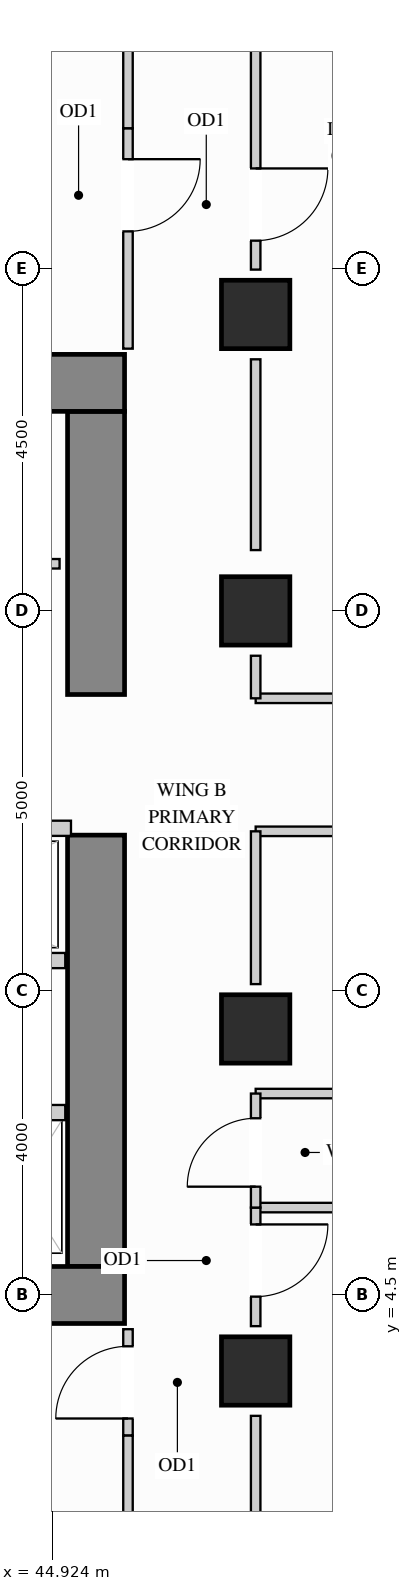
"""IFC4 building model, lengths in metres.
Left out: names, types, materials, properties, quantities, classifications, styles, units other than length and angle.
Written with IfcOpenShell. Run it as: python <this file> out.ifc"""

import sys

from ifc_helpers import new_model, si_unit, direction, frame, frame_2d, origin, origin_2d, place, context, subcontext, project, spatial, rectangle, extrude, source, transform, mapped, element, fill, save


model = new_model("IFC4")
c1 = context("Model", 3, precision=1e-05, world=origin(), true_north=direction((0.0, 1.0)))
c2 = subcontext(c1, "Body", "Model", "MODEL_VIEW")
j1 = project(units=[si_unit("LENGTHUNIT", "METRE"), si_unit("PLANEANGLEUNIT", "RADIAN")], contexts=[c1])
p1 = place(None, origin())
s1 = spatial("IfcSite", under=j1, at=p1, CompositionType="ELEMENT")
p2 = place(p1, origin())
s2 = spatial("IfcBuilding", under=s1, at=p2, CompositionType="ELEMENT")
p3 = place(p2, frame((0.0, 0.0, 120.6)))
s3 = spatial("IfcBuildingStorey", under=s2, at=p3, CompositionType="ELEMENT", Elevation=120.6)
m1 = source(origin(), c2, "Body", "SweptSolid", [
    extrude(rectangle(XDim=0.9, YDim=0.9, at=origin_2d()), origin(), (0.0, 0.0, 1.0), 3.38),
])
for number, where, z_axis, x_axis in (
    (1, (47.6, 13.5, 0.0), (0.0, 0.0, 1.0), (1.0, 0.0, 0.0)),
    (2, (47.6, 3.5, 0.0), (0.0, 0.0, 1.0), (1.0, 0.0, 0.0)),
    (3, (47.6, 8.0, 0.0), (0.0, 0.0, 1.0), (1.0, 0.0, 0.0)),
    (4, (47.6, 17.4, 0.0), (0.0, 0.0, 1.0), (1.0, 0.0, 0.0)),
):
    element("IfcColumn", number, at=place(p3, frame(where, z_axis=z_axis, x_axis=x_axis)), inside=s3, PredefinedType="COLUMN", context=c2, shape_type="MappedRepresentation", body=[
        mapped(m1, transform((0.0, 0.0, 0.0), x_axis=(1.0, 0.0, 0.0), y_axis=(0.0, 1.0, 0.0), z_axis=(0.0, 0.0, 1.0))),
    ])
m2 = source(origin(), c2, "Body", "SweptSolid", [
    extrude(rectangle(XDim=5.675, YDim=0.75, at=frame_2d((2.837, 0.0))), origin(), (0.0, 0.0, 1.0), 3.38),
])
p4 = place(p3, frame((45.5, 4.875, 0.0), z_axis=(0.0, 0.0, 1.0), x_axis=(0.0, 1.0, 0.0)))
e5 = element("IfcWall", 5, at=p4, inside=s3, PredefinedType="SHEAR", context=c2, shape_type="MappedRepresentation", body=[
    mapped(m2, transform((0.0, 0.0, 0.0), x_axis=(1.0, 0.0, 0.0), y_axis=(0.0, 1.0, 0.0), z_axis=(0.0, 0.0, 1.0))),
])
m3 = source(origin(), c2, "Body", "SweptSolid", [
    extrude(rectangle(XDim=3.725, YDim=0.75, at=frame_2d((1.863, 0.0))), origin(), (0.0, 0.0, 1.0), 3.38),
])
p5 = place(p3, frame((45.5, 12.4, 0.0), z_axis=(0.0, 0.0, 1.0), x_axis=(0.0, 1.0, 0.0)))
e6 = element("IfcWall", 6, at=p5, inside=s3, PredefinedType="SHEAR", context=c2, shape_type="MappedRepresentation", body=[
    mapped(m3, transform((0.0, 0.0, 0.0), x_axis=(1.0, 0.0, 0.0), y_axis=(0.0, 1.0, 0.0), z_axis=(0.0, 0.0, 1.0))),
])
m4 = source(origin(), c2, "Body", "SweptSolid", [
    extrude(rectangle(XDim=10.25, YDim=0.75, at=frame_2d((5.125, 0.0))), origin(), (0.0, 0.0, 1.0), 3.38),
])
for number, where, z_axis, x_axis in (
    (7, (35.625, 16.5, 0.0), (0.0, 0.0, 1.0), (1.0, 0.0, 0.0)),
    (8, (35.625, 4.5, 0.0), (0.0, 0.0, 1.0), (1.0, 0.0, 0.0)),
):
    element("IfcWall", number, at=place(p3, frame(where, z_axis=z_axis, x_axis=x_axis)), inside=s3, PredefinedType="SHEAR", context=c2, shape_type="MappedRepresentation", body=[
        mapped(m4, transform((0.0, 0.0, 0.0), x_axis=(1.0, 0.0, 0.0), y_axis=(0.0, 1.0, 0.0), z_axis=(0.0, 0.0, 1.0))),
    ])
p6 = place(p3, frame((41.8, 14.12, 0.0), z_axis=(0.0, 0.0, 1.0), x_axis=(1.0, 0.0, 0.0)))
e9 = element("IfcWall", 9, at=p6, inside=s3, PredefinedType="PARTITIONING", context=c2, shape_type="SweptSolid", body=[
    extrude(rectangle(XDim=3.22, YDim=0.125, at=frame_2d((1.61, 0.0))), origin(), (0.0, 0.0, 1.0), 3.365),
])
p7 = place(p6, frame((1.135, 0.0, 0.0)))
e10 = element("IfcOpeningElement", 10, at=p7, cuts=e9, PredefinedType="OPENING", context=c2, shape_type="SweptSolid", body=[
    extrude(rectangle(XDim=0.85, YDim=2.1, at=frame_2d((0.425, 1.05))), frame((0.0, 0.073, 0.0), z_axis=(0.0, -1.0, 0.0), x_axis=(1.0, 0.0, 0.0)), (0.0, 0.0, 1.0), 0.145),
])
m5 = source(origin(), c2, "Body", "SweptSolid", [
    extrude(rectangle(XDim=8.048, YDim=0.125, at=frame_2d((4.024, 0.0))), origin(), (0.0, 0.0, 1.0), 3.365),
])
for number, where, z_axis, x_axis in (
    (11, (47.6, 5.65, 0.0), (0.0, 0.0, 1.0), (1.0, 0.0, 0.0)),
    (12, (47.6, 7.15, 0.0), (0.0, 0.0, 1.0), (1.0, 0.0, 0.0)),
):
    element("IfcWall", number, at=place(p3, frame(where, z_axis=z_axis, x_axis=x_axis)), inside=s3, PredefinedType="PARTITIONING", context=c2, shape_type="MappedRepresentation", body=[
        mapped(m5, transform((0.0, 0.0, 0.0), x_axis=(1.0, 0.0, 0.0), y_axis=(0.0, 1.0, 0.0), z_axis=(0.0, 0.0, 1.0))),
    ])
m6 = source(origin(), c2, "Body", "SweptSolid", [
    extrude(rectangle(XDim=3.8, YDim=0.125, at=frame_2d((1.9, 0.0))), origin(), (0.0, 0.0, 1.0), 3.365),
])
p8 = place(p3, frame((47.6, 12.35, 0.0), z_axis=(0.0, 0.0, 1.0), x_axis=(1.0, 0.0, 0.0)))
e13 = element("IfcWall", 13, at=p8, inside=s3, PredefinedType="PARTITIONING", context=c2, shape_type="MappedRepresentation", body=[
    mapped(m6, transform((0.0, 0.0, 0.0), x_axis=(1.0, 0.0, 0.0), y_axis=(0.0, 1.0, 0.0), z_axis=(0.0, 0.0, 1.0))),
])
p9 = place(p3, frame((47.6, 10.6, 0.0), z_axis=(0.0, 0.0, 1.0), x_axis=(1.0, 0.0, 0.0)))
e14 = element("IfcWall", 14, at=p9, inside=s3, PredefinedType="PARTITIONING", context=c2, shape_type="SweptSolid", body=[
    extrude(rectangle(XDim=3.8, YDim=0.125, at=frame_2d((1.9, 0.0))), origin(), (0.0, 0.0, 1.0), 2.677),
])
p10 = place(p9, frame((1.425, 0.0, 0.0)))
e15 = element("IfcOpeningElement", 15, at=p10, cuts=e14, PredefinedType="OPENING", context=c2, shape_type="SweptSolid", body=[
    extrude(rectangle(XDim=0.95, YDim=2.15, at=frame_2d((0.475, 1.075))), frame((0.0, 0.073, 0.0), z_axis=(0.0, -1.0, 0.0), x_axis=(1.0, 0.0, 0.0)), (0.0, 0.0, 1.0), 0.145),
])
p11 = place(p3, frame((47.6, 4.09, 0.0), z_axis=(0.0, 0.0, 1.0), x_axis=(0.0, 1.0, 0.0)))
e16 = element("IfcWall", 16, at=p11, inside=s3, PredefinedType="PARTITIONING", context=c2, shape_type="SweptSolid", body=[
    extrude(rectangle(XDim=1.56, YDim=0.125, at=frame_2d((0.78, 0.0))), origin(), (0.0, 0.0, 1.0), 2.677),
])
p12 = place(p11, frame((0.388, 0.0, 0.0)))
e17 = element("IfcOpeningElement", 17, at=p12, cuts=e16, PredefinedType="OPENING", context=c2, shape_type="SweptSolid", body=[
    extrude(rectangle(XDim=0.95, YDim=2.15, at=frame_2d((0.475, 1.075))), frame((0.0, 0.073, 0.0), z_axis=(0.0, -1.0, 0.0), x_axis=(1.0, 0.0, 0.0)), (0.0, 0.0, 1.0), 0.145),
])
m7 = source(origin(), c2, "Body", "SweptSolid", [
    extrude(rectangle(XDim=1.72, YDim=0.125, at=frame_2d((0.86, 0.0))), origin(), (0.0, 0.0, 1.0), 2.677),
])
p13 = place(p3, frame((47.6, 1.19, 0.0), z_axis=(0.0, 0.0, 1.0), x_axis=(0.0, 1.0, 0.0)))
e18 = element("IfcWall", 18, at=p13, inside=s3, PredefinedType="PARTITIONING", context=c2, shape_type="MappedRepresentation", body=[
    mapped(m7, transform((0.0, 0.0, 0.0), x_axis=(1.0, 0.0, 0.0), y_axis=(0.0, 1.0, 0.0), z_axis=(0.0, 0.0, 1.0))),
])
m8 = source(origin(), c2, "Body", "SweptSolid", [
    extrude(rectangle(XDim=2.01, YDim=0.125, at=frame_2d((1.005, 0.0))), origin(), (0.0, 0.0, 1.0), 2.677),
])
p14 = place(p3, frame((47.6, 8.59, 0.0), z_axis=(0.0, 0.0, 1.0), x_axis=(0.0, 1.0, 0.0)))
e19 = element("IfcWall", 19, at=p14, inside=s3, PredefinedType="PARTITIONING", context=c2, shape_type="MappedRepresentation", body=[
    mapped(m8, transform((0.0, 0.0, 0.0), x_axis=(1.0, 0.0, 0.0), y_axis=(0.0, 1.0, 0.0), z_axis=(0.0, 0.0, 1.0))),
])
m9 = source(origin(), c2, "Body", "SweptSolid", [
    extrude(rectangle(XDim=2.51, YDim=0.125, at=frame_2d((1.255, 0.0))), origin(), (0.0, 0.0, 1.0), 2.677),
])
p15 = place(p3, frame((47.6, 14.3, 0.0), z_axis=(0.0, 0.0, 1.0), x_axis=(0.0, 1.0, 0.0)))
e20 = element("IfcWall", 20, at=p15, inside=s3, PredefinedType="PARTITIONING", context=c2, shape_type="MappedRepresentation", body=[
    mapped(m9, transform((0.0, 0.0, 0.0), x_axis=(1.0, 0.0, 0.0), y_axis=(0.0, 1.0, 0.0), z_axis=(0.0, 0.0, 1.0))),
])
p16 = place(p3, frame((47.6, 17.99, 0.0), z_axis=(0.0, 0.0, 1.0), x_axis=(0.0, 1.0, 0.0)))
e21 = element("IfcWall", 21, at=p16, inside=s3, PredefinedType="PARTITIONING", context=c2, shape_type="SweptSolid", body=[
    extrude(rectangle(XDim=3.32, YDim=0.125, at=frame_2d((1.66, 0.0))), origin(), (0.0, 0.0, 1.0), 2.677),
])
p17 = place(p16, frame((0.381, 0.0, 0.0)))
e22 = element("IfcOpeningElement", 22, at=p17, cuts=e21, PredefinedType="OPENING", context=c2, shape_type="SweptSolid", body=[
    extrude(rectangle(XDim=0.95, YDim=2.15, at=frame_2d((0.475, 1.075))), frame((0.0, 0.073, 0.0), z_axis=(0.0, -1.0, 0.0), x_axis=(1.0, 0.0, 0.0)), (0.0, 0.0, 1.0), 0.145),
])
m10 = source(origin(), c2, "Body", "SweptSolid", [
    extrude(rectangle(XDim=0.56, YDim=0.125, at=frame_2d((0.28, 0.0))), origin(), (0.0, 0.0, 1.0), 2.677),
])
p18 = place(p3, frame((47.6, 12.35, 0.0), z_axis=(0.0, 0.0, 1.0), x_axis=(0.0, 1.0, 0.0)))
e23 = element("IfcWall", 23, at=p18, inside=s3, PredefinedType="PARTITIONING", context=c2, shape_type="MappedRepresentation", body=[
    mapped(m10, transform((0.0, 0.0, 0.0), x_axis=(1.0, 0.0, 0.0), y_axis=(0.0, 1.0, 0.0), z_axis=(0.0, 0.0, 1.0))),
])
p19 = place(p3, frame((47.6, 5.65, 0.0), z_axis=(0.0, 0.0, 1.0), x_axis=(0.0, 1.0, 0.0)))
e24 = element("IfcWall", 24, at=p19, inside=s3, PredefinedType="PARTITIONING", context=c2, shape_type="SweptSolid", body=[
    extrude(rectangle(XDim=1.5, YDim=0.125, at=frame_2d((0.75, 0.0))), origin(), (0.0, 0.0, 1.0), 2.677),
])
p20 = place(p19, frame((0.275, 0.0, 0.0)))
e25 = element("IfcOpeningElement", 25, at=p20, cuts=e24, PredefinedType="OPENING", context=c2, shape_type="SweptSolid", body=[
    extrude(rectangle(XDim=0.9, YDim=2.15, at=frame_2d((0.45, 1.075))), frame((0.0, 0.073, 0.0), z_axis=(0.0, -1.0, 0.0), x_axis=(1.0, 0.0, 0.0)), (0.0, 0.0, 1.0), 0.145),
])
p21 = place(p3, frame((45.92, 16.95, 0.0), z_axis=(0.0, 0.0, 1.0), x_axis=(0.0, 1.0, 0.0)))
e26 = element("IfcWall", 26, at=p21, inside=s3, PredefinedType="PARTITIONING", context=c2, shape_type="SweptSolid", body=[
    extrude(rectangle(XDim=2.9, YDim=0.125, at=frame_2d((1.45, 0.0))), origin(), (0.0, 0.0, 1.0), 3.365),
])
p22 = place(p21, frame((1.543, 0.0, 0.0)))
e27 = element("IfcOpeningElement", 27, at=p22, cuts=e26, PredefinedType="OPENING", context=c2, shape_type="SweptSolid", body=[
    extrude(rectangle(XDim=0.95, YDim=2.15, at=frame_2d((0.475, 1.075))), frame((0.0, 0.073, 0.0), z_axis=(0.0, -1.0, 0.0), x_axis=(1.0, 0.0, 0.0)), (0.0, 0.0, 1.0), 0.145),
])
m11 = source(origin(), c2, "Body", "SweptSolid", [
    extrude(rectangle(XDim=2.298, YDim=0.125, at=frame_2d((1.149, 0.0))), origin(), (0.0, 0.0, 1.0), 3.365),
])
p23 = place(p3, frame((45.92, 19.85, 0.0), z_axis=(0.0, 0.0, 1.0), x_axis=(0.0, 1.0, 0.0)))
e28 = element("IfcWall", 28, at=p23, inside=s3, PredefinedType="PARTITIONING", context=c2, shape_type="MappedRepresentation", body=[
    mapped(m11, transform((0.0, 0.0, 0.0), x_axis=(1.0, 0.0, 0.0), y_axis=(0.0, 1.0, 0.0), z_axis=(0.0, 0.0, 1.0))),
])
p24 = place(p3, frame((45.92, 2.65, 0.0), z_axis=(0.0, 0.0, 1.0), x_axis=(0.0, 1.0, 0.0)))
e29 = element("IfcWall", 29, at=p24, inside=s3, PredefinedType="PARTITIONING", context=c2, shape_type="SweptSolid", body=[
    extrude(rectangle(XDim=1.4, YDim=0.125, at=frame_2d((0.7, 0.0))), origin(), (0.0, 0.0, 1.0), 3.365),
])
p25 = place(p24, frame((0.225, 0.0, 0.0)))
e30 = element("IfcOpeningElement", 30, at=p25, cuts=e29, PredefinedType="OPENING", context=c2, shape_type="SweptSolid", body=[
    extrude(rectangle(XDim=0.95, YDim=2.15, at=frame_2d((0.475, 1.075))), frame((0.0, 0.073, 0.0), z_axis=(0.0, -1.0, 0.0), x_axis=(1.0, 0.0, 0.0)), (0.0, 0.0, 1.0), 0.145),
])
p26 = place(p3, frame((45.92, 0.352, 0.0), z_axis=(0.0, 0.0, 1.0), x_axis=(0.0, 1.0, 0.0)))
e31 = element("IfcWall", 31, at=p26, inside=s3, PredefinedType="PARTITIONING", context=c2, shape_type="MappedRepresentation", body=[
    mapped(m11, transform((0.0, 0.0, 0.0), x_axis=(1.0, 0.0, 0.0), y_axis=(0.0, 1.0, 0.0), z_axis=(0.0, 0.0, 1.0))),
])
m12 = source(origin(), c2, "Body", "SweptSolid", [
    extrude(rectangle(XDim=1.245, YDim=0.2, at=frame_2d((0.623, 0.0))), origin(), (0.0, 0.0, 1.0), 3.365),
])
p27 = place(p3, frame((43.85, 6.9, 0.0), z_axis=(0.0, 0.0, 1.0), x_axis=(1.0, 0.0, 0.0)))
e32 = element("IfcWall", 32, at=p27, inside=s3, PredefinedType="PARTITIONING", context=c2, shape_type="MappedRepresentation", body=[
    mapped(m12, transform((0.0, 0.0, 0.0), x_axis=(1.0, 0.0, 0.0), y_axis=(0.0, 1.0, 0.0), z_axis=(0.0, 0.0, 1.0))),
])
m13 = source(origin(), c2, "Body", "SweptSolid", [
    extrude(rectangle(XDim=3.49, YDim=0.2, at=frame_2d((1.745, 0.0))), origin(), (0.0, 0.0, 1.0), 3.365),
])
p28 = place(p3, frame((41.68, 10.64, 0.0), z_axis=(0.0, 0.0, 1.0), x_axis=(1.0, 0.0, 0.0)))
e33 = element("IfcWall", 33, at=p28, inside=s3, PredefinedType="PARTITIONING", context=c2, shape_type="MappedRepresentation", body=[
    mapped(m13, transform((0.0, 0.0, 0.0), x_axis=(1.0, 0.0, 0.0), y_axis=(0.0, 1.0, 0.0), z_axis=(0.0, 0.0, 1.0))),
])
m14 = source(origin(), c2, "Body", "SweptSolid", [
    extrude(rectangle(XDim=3.415, YDim=0.2, at=frame_2d((1.708, 0.0))), origin(), (0.0, 0.0, 1.0), 3.365),
])
p29 = place(p3, frame((41.68, 8.9, 0.0), z_axis=(0.0, 0.0, 1.0), x_axis=(1.0, 0.0, 0.0)))
e34 = element("IfcWall", 34, at=p29, inside=s3, PredefinedType="PARTITIONING", context=c2, shape_type="MappedRepresentation", body=[
    mapped(m14, transform((0.0, 0.0, 0.0), x_axis=(1.0, 0.0, 0.0), y_axis=(0.0, 1.0, 0.0), z_axis=(0.0, 0.0, 1.0))),
])
m15 = source(origin(), c2, "Body", "SweptSolid", [
    extrude(rectangle(XDim=0.95, YDim=2.15, at=frame_2d((0.475, 1.075))), frame((0.0, 0.025, 0.0), z_axis=(0.0, -1.0, 0.0), x_axis=(1.0, 0.0, 0.0)), (0.0, 0.0, 1.0), 0.05),
])
p30 = place(p22, origin())
e35 = element("IfcDoor", 35, at=p30, inside=s3, OperationType="SINGLE_SWING_RIGHT", PredefinedType="DOOR", context=c2, shape_type="MappedRepresentation", body=[
    mapped(m15, transform((0.0, 0.0, 0.0), x_axis=(1.0, 0.0, 0.0), y_axis=(0.0, 1.0, 0.0), z_axis=(0.0, 0.0, 1.0))),
])
fill(e27, e35)
p31 = place(p25, origin())
e36 = element("IfcDoor", 36, at=p31, inside=s3, OperationType="SINGLE_SWING_LEFT", PredefinedType="DOOR", context=c2, shape_type="MappedRepresentation", body=[
    mapped(m15, transform((0.0, 0.0, 0.0), x_axis=(1.0, 0.0, 0.0), y_axis=(0.0, 1.0, 0.0), z_axis=(0.0, 0.0, 1.0))),
])
fill(e30, e36)
p32 = place(p12, origin())
e37 = element("IfcDoor", 37, at=p32, inside=s3, OperationType="SINGLE_SWING_RIGHT", PredefinedType="DOOR", context=c2, shape_type="MappedRepresentation", body=[
    mapped(m15, transform((0.0, 0.0, 0.0), x_axis=(1.0, 0.0, 0.0), y_axis=(0.0, 1.0, 0.0), z_axis=(0.0, 0.0, 1.0))),
])
fill(e17, e37)
p33 = place(p17, origin())
e38 = element("IfcDoor", 38, at=p33, inside=s3, OperationType="SINGLE_SWING_RIGHT", PredefinedType="DOOR", context=c2, shape_type="MappedRepresentation", body=[
    mapped(m15, transform((0.0, 0.0, 0.0), x_axis=(1.0, 0.0, 0.0), y_axis=(0.0, 1.0, 0.0), z_axis=(0.0, 0.0, 1.0))),
])
fill(e22, e38)
m16 = source(origin(), c2, "Body", "SweptSolid", [
    extrude(rectangle(XDim=0.9, YDim=2.15, at=frame_2d((0.45, 1.075))), frame((0.0, 0.025, 0.0), z_axis=(0.0, -1.0, 0.0), x_axis=(1.0, 0.0, 0.0)), (0.0, 0.0, 1.0), 0.05),
])
p34 = place(p20, origin())
e39 = element("IfcDoor", 39, at=p34, inside=s3, OperationType="SINGLE_SWING_LEFT", PredefinedType="DOOR", context=c2, shape_type="MappedRepresentation", body=[
    mapped(m16, transform((0.0, 0.0, 0.0), x_axis=(1.0, 0.0, 0.0), y_axis=(0.0, 1.0, 0.0), z_axis=(0.0, 0.0, 1.0))),
])
fill(e25, e39)
save(model, sys.argv[1])
